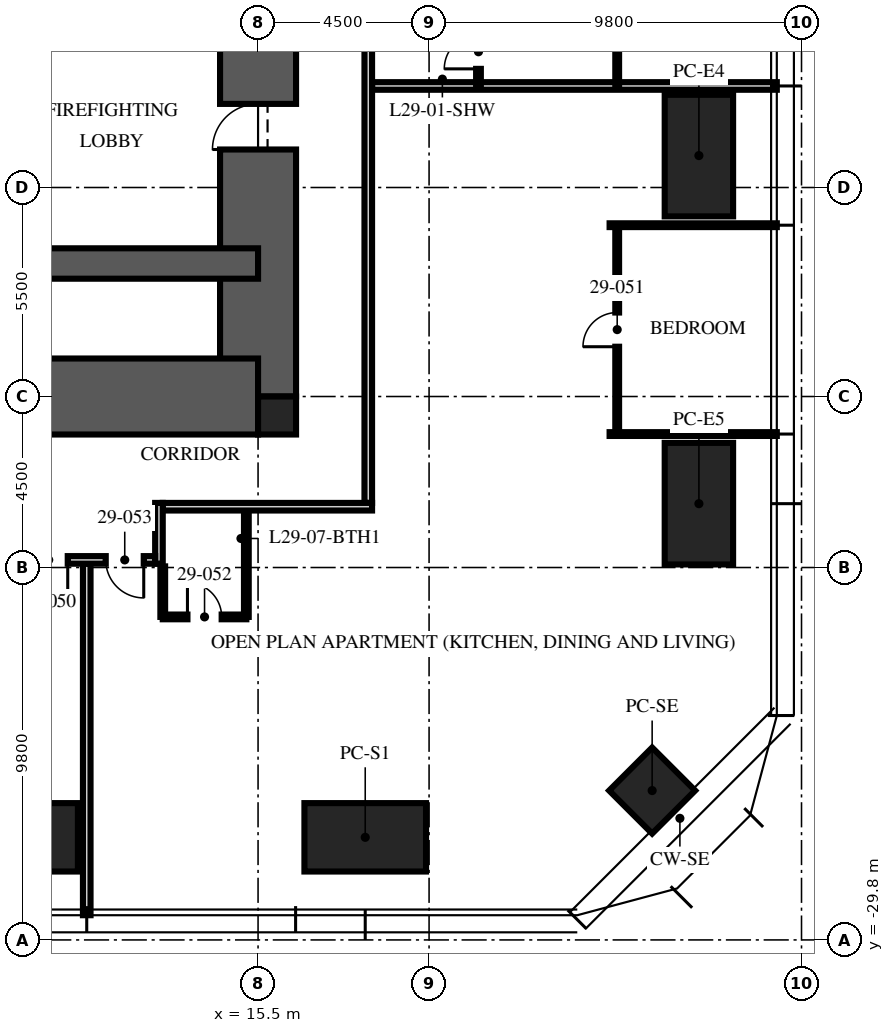
"""IFC4 building model, lengths in metres.
Left out: names, types, materials, properties, quantities, classifications, styles, units other than length and angle.
Written with IfcOpenShell. Run it as: python <this file> out.ifc"""

import sys

from ifc_helpers import new_model, si_unit, direction, frame, frame_2d, origin, origin_2d, place, context, subcontext, project, spatial, rectangle, hollow_rectangle, extrude, element, fill, save


model = new_model("IFC4")
c1 = context("Model", 3, precision=1e-05, world=origin(), true_north=direction((0.0, 1.0)))
c2 = subcontext(c1, "Body", "Model", "MODEL_VIEW")
j1 = project(units=[si_unit("LENGTHUNIT", "METRE"), si_unit("PLANEANGLEUNIT", "RADIAN")], contexts=[c1])
p1 = place(None, origin())
s1 = spatial("IfcSite", under=j1, at=p1, CompositionType="ELEMENT")
p2 = place(p1, origin())
s2 = spatial("IfcBuilding", under=s1, at=p2, CompositionType="ELEMENT")
p3 = place(p2, frame((0.0, 0.0, 118.5)))
s3 = spatial("IfcBuildingStorey", under=s2, at=p3, CompositionType="ELEMENT", Elevation=118.5)
p4 = place(p3, frame((15.5, -15.5, -0.25), z_axis=(0.0, 0.0, 1.0), x_axis=(0.0, 1.0, 0.0)))
e1 = element("IfcWall", 1, at=p4, inside=s3, PredefinedType="SHEAR", context=c2, shape_type="SweptSolid", body=[
    extrude(rectangle(XDim=31.0, YDim=2.0, at=frame_2d((15.5, 0.0))), origin(), (0.0, 0.0, 1.0), 3.75),
])
p5 = place(p4, frame((6.5, 0.0, 0.25)))
e2 = element("IfcOpeningElement", 2, at=p5, cuts=e1, PredefinedType="OPENING", context=c2, shape_type="SweptSolid", body=[
    extrude(rectangle(XDim=1.2, YDim=2.1, at=frame_2d((0.6, 1.05))), frame((0.0, 1.01, 0.0), z_axis=(0.0, -1.0, 0.0), x_axis=(1.0, 0.0, 0.0)), (0.0, 0.0, 1.0), 2.02),
])
p6 = place(p4, frame((23.0, 0.0, 0.25)))
e3 = element("IfcOpeningElement", 3, at=p6, cuts=e1, PredefinedType="OPENING", context=c2, shape_type="SweptSolid", body=[
    extrude(rectangle(XDim=1.8, YDim=2.1, at=frame_2d((0.9, 1.05))), frame((0.0, 1.01, 0.0), z_axis=(0.0, -1.0, 0.0), x_axis=(1.0, 0.0, 0.0)), (0.0, 0.0, 1.0), 2.02),
])
p7 = place(p3, frame((-15.5, -15.5, -0.25), z_axis=(0.0, 0.0, 1.0), x_axis=(1.0, 0.0, 0.0)))
e4 = element("IfcWall", 4, at=p7, inside=s3, PredefinedType="SHEAR", context=c2, shape_type="SweptSolid", body=[
    extrude(rectangle(XDim=31.0, YDim=2.0, at=frame_2d((15.5, 0.0))), origin(), (0.0, 0.0, 1.0), 3.75),
])
p8 = place(p7, frame((10.4, 0.0, 0.25)))
e5 = element("IfcOpeningElement", 5, at=p8, cuts=e4, PredefinedType="OPENING", context=c2, shape_type="SweptSolid", body=[
    extrude(rectangle(XDim=1.1, YDim=2.1, at=frame_2d((0.55, 1.05))), frame((0.0, 1.01, 0.0), z_axis=(0.0, -1.0, 0.0), x_axis=(1.0, 0.0, 0.0)), (0.0, 0.0, 1.0), 2.02),
])
p9 = place(p7, frame((13.5, 0.0, 0.25)))
e6 = element("IfcOpeningElement", 6, at=p9, cuts=e4, PredefinedType="OPENING", context=c2, shape_type="SweptSolid", body=[
    extrude(rectangle(XDim=1.1, YDim=2.1, at=frame_2d((0.55, 1.05))), frame((0.0, 1.01, 0.0), z_axis=(0.0, -1.0, 0.0), x_axis=(1.0, 0.0, 0.0)), (0.0, 0.0, 1.0), 2.02),
])
p10 = place(p7, frame((16.6, 0.0, 0.25)))
e7 = element("IfcOpeningElement", 7, at=p10, cuts=e4, PredefinedType="OPENING", context=c2, shape_type="SweptSolid", body=[
    extrude(rectangle(XDim=1.1, YDim=2.1, at=frame_2d((0.55, 1.05))), frame((0.0, 1.01, 0.0), z_axis=(0.0, -1.0, 0.0), x_axis=(1.0, 0.0, 0.0)), (0.0, 0.0, 1.0), 2.02),
])
p11 = place(p3, frame((-15.5, -12.0, -0.25), z_axis=(0.0, 0.0, 1.0), x_axis=(1.0, 0.0, 0.0)))
e8 = element("IfcWall", 8, at=p11, inside=s3, PredefinedType="SHEAR", context=c2, shape_type="SweptSolid", body=[
    extrude(rectangle(XDim=31.0, YDim=0.8, at=frame_2d((15.5, 0.0))), origin(), (0.0, 0.0, 1.0), 3.75),
])
p12 = place(p3, frame((16.0, -16.0, -0.25), z_axis=(0.0, 0.0, 1.0), x_axis=(1.0, 0.0, 0.0)))
e9 = element("IfcColumn", 9, at=p12, inside=s3, PredefinedType="COLUMN", context=c2, shape_type="SweptSolid", body=[
    extrude(rectangle(XDim=1.0, YDim=1.0, at=origin_2d()), origin(), (0.0, 0.0, 1.0), 3.75),
])
for number, where, z_axis, x_axis in (
    (10, (27.1, -9.16, 0.0), (0.0, 0.0, 1.0), (0.0, 1.0, 0.0)),
    (11, (27.1, -18.32, 0.0), (0.0, 0.0, 1.0), (0.0, 1.0, 0.0)),
    (12, (18.32, -27.1, 0.0), (0.0, 0.0, 1.0), (1.0, 0.0, 0.0)),
    (13, (9.16, -27.1, 0.0), (0.0, 0.0, 1.0), (1.0, 0.0, 0.0)),
):
    element("IfcColumn", number, at=place(p3, frame(where, z_axis=z_axis, x_axis=x_axis)), inside=s3, PredefinedType="COLUMN", context=c2, shape_type="SweptSolid", body=[
        extrude(hollow_rectangle(XDim=3.2, YDim=1.8, WallThickness=0.2, at=origin_2d()), origin(), (0.0, 0.0, 1.0), 3.75),
    ])
p13 = place(p3, frame((25.87, -25.87, 0.0), z_axis=(0.0, 0.0, 1.0), x_axis=(0.707106781187, 0.707106781187, 0.0)))
e14 = element("IfcColumn", 14, at=p13, inside=s3, PredefinedType="COLUMN", context=c2, shape_type="SweptSolid", body=[
    extrude(hollow_rectangle(XDim=1.6, YDim=1.6, WallThickness=0.1, at=origin_2d()), origin(), (0.0, 0.0, 1.0), 3.75),
])
p14 = place(p3, frame((18.5, -7.328, 0.0), z_axis=(0.0, 0.0, 1.0), x_axis=(1.0, 0.0, 0.0)))
e15 = element("IfcWall", 15, at=p14, inside=s3, PredefinedType="PARTITIONING", context=c2, shape_type="SweptSolid", body=[
    extrude(rectangle(XDim=10.65, YDim=0.2, at=frame_2d((5.325, 0.0))), origin(), (0.0, 0.0, 1.0), 2.81),
])
p15 = place(p3, frame((10.992, -19.9, 0.0), z_axis=(0.0, 0.0, 1.0), x_axis=(0.0, -1.0, 0.0)))
e16 = element("IfcWall", 16, at=p15, inside=s3, PredefinedType="PARTITIONING", context=c2, shape_type="SweptSolid", body=[
    extrude(rectangle(XDim=9.25, YDim=0.2, at=frame_2d((4.625, 0.0))), origin(), (0.0, 0.0, 1.0), 2.81),
])
for number, where, z_axis, x_axis in (
    (17, (24.75, -16.488, 0.0), (0.0, 0.0, 1.0), (1.0, 0.0, 0.0)),
    (18, (24.75, -10.992, 0.0), (0.0, 0.0, 1.0), (1.0, 0.0, 0.0)),
):
    element("IfcWall", number, at=place(p3, frame(where, z_axis=z_axis, x_axis=x_axis)), inside=s3, PredefinedType="PARTITIONING", context=c2, shape_type="SweptSolid", body=[
        extrude(rectangle(XDim=4.4, YDim=0.1, at=frame_2d((2.2, 0.0))), origin(), (0.0, 0.0, 1.0), 2.81),
    ])
p16 = place(p3, frame((24.95, -7.328, 0.0), z_axis=(0.0, 0.0, 1.0), x_axis=(0.0, 1.0, 0.0)))
e19 = element("IfcWall", 19, at=p16, inside=s3, PredefinedType="PARTITIONING", context=c2, shape_type="SweptSolid", body=[
    extrude(rectangle(XDim=5.496, YDim=0.1, at=frame_2d((2.748, 0.0))), origin(), (0.0, 0.0, 1.0), 2.81),
])
p17 = place(p16, frame((2.298, 0.0, 0.0)))
e20 = element("IfcOpeningElement", 20, at=p17, cuts=e19, PredefinedType="OPENING", context=c2, shape_type="SweptSolid", body=[
    extrude(rectangle(XDim=0.9, YDim=2.1, at=frame_2d((0.45, 1.05))), frame((0.0, 0.06, 0.0), z_axis=(0.0, -1.0, 0.0), x_axis=(1.0, 0.0, 0.0)), (0.0, 0.0, 1.0), 0.12),
])
p18 = place(p3, frame((21.3, -7.328, 0.0), z_axis=(0.0, 0.0, 1.0), x_axis=(0.0, 1.0, 0.0)))
e21 = element("IfcWall", 21, at=p18, inside=s3, PredefinedType="PARTITIONING", context=c2, shape_type="SweptSolid", body=[
    extrude(rectangle(XDim=1.8, YDim=0.125, at=frame_2d((0.9, 0.0))), origin(), (0.0, 0.0, 1.0), 3.5),
])
p19 = place(p18, frame((0.45, 0.0, 0.0)))
e22 = element("IfcOpeningElement", 22, at=p19, cuts=e21, PredefinedType="OPENING", context=c2, shape_type="SweptSolid", body=[
    extrude(rectangle(XDim=0.9, YDim=2.1, at=frame_2d((0.45, 1.05))), frame((0.0, 0.073, 0.0), z_axis=(0.0, -1.0, 0.0), x_axis=(1.0, 0.0, 0.0)), (0.0, 0.0, 1.0), 0.145),
])
p20 = place(p3, frame((24.95, -16.488, 0.0), z_axis=(0.0, 0.0, 1.0), x_axis=(0.0, 1.0, 0.0)))
e23 = element("IfcWall", 23, at=p20, inside=s3, PredefinedType="PARTITIONING", context=c2, shape_type="SweptSolid", body=[
    extrude(rectangle(XDim=5.496, YDim=0.1, at=frame_2d((2.748, 0.0))), origin(), (0.0, 0.0, 1.0), 2.81),
])
p21 = place(p20, frame((2.298, 0.0, 0.0)))
e24 = element("IfcOpeningElement", 24, at=p21, cuts=e23, PredefinedType="OPENING", context=c2, shape_type="SweptSolid", body=[
    extrude(rectangle(XDim=0.9, YDim=2.1, at=frame_2d((0.45, 1.05))), frame((0.0, 0.06, 0.0), z_axis=(0.0, -1.0, 0.0), x_axis=(1.0, 0.0, 0.0)), (0.0, 0.0, 1.0), 0.12),
])
p22 = place(p3, frame((12.992, -21.3, 0.0), z_axis=(0.0, 0.0, 1.0), x_axis=(1.0, 0.0, 0.0)))
e25 = element("IfcWall", 25, at=p22, inside=s3, PredefinedType="PARTITIONING", context=c2, shape_type="SweptSolid", body=[
    extrude(rectangle(XDim=2.2, YDim=0.125, at=frame_2d((1.1, 0.0))), origin(), (0.0, 0.0, 1.0), 2.81),
])
p23 = place(p22, frame((0.65, 0.0, 0.0)))
e26 = element("IfcOpeningElement", 26, at=p23, cuts=e25, PredefinedType="OPENING", context=c2, shape_type="SweptSolid", body=[
    extrude(rectangle(XDim=0.9, YDim=2.1, at=frame_2d((0.45, 1.05))), frame((0.0, 0.073, 0.0), z_axis=(0.0, -1.0, 0.0), x_axis=(1.0, 0.0, 0.0)), (0.0, 0.0, 1.0), 0.145),
])
p24 = place(p3, frame((12.992, -19.97, 0.0), z_axis=(0.0, 0.0, 1.0), x_axis=(0.0, -1.0, 0.0)))
e27 = element("IfcWall", 27, at=p24, inside=s3, PredefinedType="PARTITIONING", context=c2, shape_type="SweptSolid", body=[
    extrude(rectangle(XDim=1.33, YDim=0.125, at=frame_2d((0.665, 0.0))), origin(), (0.0, 0.0, 1.0), 3.5),
])
p25 = place(p3, frame((15.192, -18.5, 0.0), z_axis=(0.0, 0.0, 1.0), x_axis=(0.0, -1.0, 0.0)))
e28 = element("IfcWall", 28, at=p25, inside=s3, PredefinedType="PARTITIONING", context=c2, shape_type="SweptSolid", body=[
    extrude(rectangle(XDim=2.8, YDim=0.125, at=frame_2d((1.4, 0.0))), origin(), (0.0, 0.0, 1.0), 3.5),
])
p26 = place(p3, frame((18.4, -18.3, 0.0), z_axis=(0.0, 0.0, 1.0), x_axis=(0.0, 1.0, 0.0)))
e29 = element("IfcWall", 29, at=p26, inside=s3, PredefinedType="PARTITIONING", context=c2, shape_type="SweptSolid", body=[
    extrude(rectangle(XDim=27.292, YDim=0.2, at=frame_2d((13.646, 0.0))), origin(), (0.0, 0.0, 1.0), 2.3),
])
p27 = place(p3, frame((18.5, -18.4, 0.0), z_axis=(0.0, 0.0, 1.0), x_axis=(-1.0, 0.0, 0.0)))
e30 = element("IfcWall", 30, at=p27, inside=s3, PredefinedType="PARTITIONING", context=c2, shape_type="SweptSolid", body=[
    extrude(rectangle(XDim=5.508, YDim=0.2, at=frame_2d((2.754, 0.0))), origin(), (0.0, 0.0, 1.0), 2.3),
])
p28 = place(p3, frame((12.892, -18.3, 0.0), z_axis=(0.0, 0.0, 1.0), x_axis=(0.0, -1.0, 0.0)))
e31 = element("IfcWall", 31, at=p28, inside=s3, PredefinedType="PARTITIONING", context=c2, shape_type="SweptSolid", body=[
    extrude(rectangle(XDim=1.6, YDim=0.2, at=frame_2d((0.8, 0.0))), origin(), (0.0, 0.0, 1.0), 3.5),
])
p29 = place(p3, frame((12.792, -19.8, 0.0), z_axis=(0.0, 0.0, 1.0), x_axis=(-1.0, 0.0, 0.0)))
e32 = element("IfcWall", 32, at=p29, inside=s3, PredefinedType="PARTITIONING", context=c2, shape_type="SweptSolid", body=[
    extrude(rectangle(XDim=3.6, YDim=0.2, at=frame_2d((1.8, 0.0))), origin(), (0.0, 0.0, 1.0), 2.7),
])
p30 = place(p29, frame((2.3, 0.0, 0.0)))
e33 = element("IfcOpeningElement", 33, at=p30, cuts=e32, PredefinedType="OPENING", context=c2, shape_type="SweptSolid", body=[
    extrude(rectangle(XDim=1.0, YDim=2.2, at=frame_2d((0.5, 1.1))), frame((0.0, 0.11, 0.0), z_axis=(0.0, -1.0, 0.0), x_axis=(1.0, 0.0, 0.0)), (0.0, 0.0, 1.0), 0.22),
])
p31 = place(p29, frame((0.3, 0.0, 0.0)))
e34 = element("IfcOpeningElement", 34, at=p31, cuts=e32, PredefinedType="OPENING", context=c2, shape_type="SweptSolid", body=[
    extrude(rectangle(XDim=1.0, YDim=2.2, at=frame_2d((0.5, 1.1))), frame((0.0, 0.11, 0.0), z_axis=(0.0, -1.0, 0.0), x_axis=(1.0, 0.0, 0.0)), (0.0, 0.0, 1.0), 0.22),
])
p32 = place(p5, origin())
e35 = element("IfcDoor", 35, at=p32, inside=s3, OperationType="SINGLE_SWING_LEFT", PredefinedType="DOOR", context=c2, shape_type="SweptSolid", body=[
    extrude(rectangle(XDim=1.2, YDim=2.1, at=frame_2d((0.6, 1.05))), frame((0.0, 0.025, 0.0), z_axis=(0.0, -1.0, 0.0), x_axis=(1.0, 0.0, 0.0)), (0.0, 0.0, 1.0), 0.05),
])
fill(e2, e35)
p33 = place(p19, origin())
e36 = element("IfcDoor", 36, at=p33, inside=s3, OperationType="SINGLE_SWING_LEFT", PredefinedType="DOOR", context=c2, shape_type="SweptSolid", body=[
    extrude(rectangle(XDim=0.9, YDim=2.1, at=frame_2d((0.45, 1.05))), frame((0.0, 0.025, 0.0), z_axis=(0.0, -1.0, 0.0), x_axis=(1.0, 0.0, 0.0)), (0.0, 0.0, 1.0), 0.05),
])
fill(e22, e36)
p34 = place(p30, origin())
e37 = element("IfcDoor", 37, at=p34, inside=s3, OperationType="SINGLE_SWING_LEFT", PredefinedType="DOOR", context=c2, shape_type="SweptSolid", body=[
    extrude(rectangle(XDim=1.0, YDim=2.2, at=frame_2d((0.5, 1.1))), frame((0.0, 0.025, 0.0), z_axis=(0.0, -1.0, 0.0), x_axis=(1.0, 0.0, 0.0)), (0.0, 0.0, 1.0), 0.05),
])
fill(e33, e37)
p35 = place(p21, origin())
e38 = element("IfcDoor", 38, at=p35, inside=s3, OperationType="SINGLE_SWING_LEFT", PredefinedType="DOOR", context=c2, shape_type="SweptSolid", body=[
    extrude(rectangle(XDim=0.9, YDim=2.1, at=frame_2d((0.45, 1.05))), frame((0.0, 0.025, 0.0), z_axis=(0.0, -1.0, 0.0), x_axis=(1.0, 0.0, 0.0)), (0.0, 0.0, 1.0), 0.05),
])
fill(e24, e38)
p36 = place(p23, origin())
e39 = element("IfcDoor", 39, at=p36, inside=s3, OperationType="SINGLE_SWING_LEFT", PredefinedType="DOOR", context=c2, shape_type="SweptSolid", body=[
    extrude(rectangle(XDim=0.9, YDim=2.1, at=frame_2d((0.45, 1.05))), frame((0.0, 0.025, 0.0), z_axis=(0.0, -1.0, 0.0), x_axis=(1.0, 0.0, 0.0)), (0.0, 0.0, 1.0), 0.05),
])
fill(e26, e39)
p37 = place(p31, origin())
e40 = element("IfcDoor", 40, at=p37, inside=s3, OperationType="SINGLE_SWING_LEFT", PredefinedType="DOOR", context=c2, shape_type="SweptSolid", body=[
    extrude(rectangle(XDim=1.0, YDim=2.2, at=frame_2d((0.5, 1.1))), frame((0.0, 0.025, 0.0), z_axis=(0.0, -1.0, 0.0), x_axis=(1.0, 0.0, 0.0)), (0.0, 0.0, 1.0), 0.05),
])
fill(e34, e40)
save(model, sys.argv[1])
